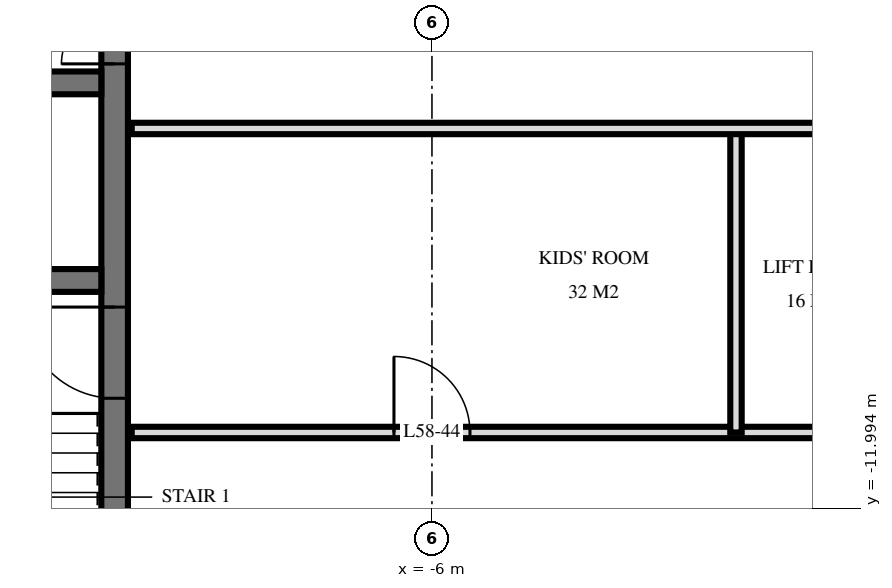
"""IFC4 building model, lengths in metres.
Left out: names, types, materials, properties, quantities, classifications, styles, units other than length and angle.
Written with IfcOpenShell. Run it as: python <this file> out.ifc"""

import sys

from ifc_helpers import new_model, si_unit, direction, frame, frame_2d, origin, place, context, subcontext, project, spatial, rectangle, extrude, element, fill, save


model = new_model("IFC4")
c1 = context("Model", 3, precision=1e-05, world=origin(), true_north=direction((0.0, 1.0)))
c2 = subcontext(c1, "Body", "Model", "MODEL_VIEW")
j1 = project(units=[si_unit("LENGTHUNIT", "METRE"), si_unit("PLANEANGLEUNIT", "RADIAN")], contexts=[c1])
p1 = place(None, origin())
s1 = spatial("IfcSite", under=j1, at=p1, CompositionType="ELEMENT")
p2 = place(p1, origin())
s2 = spatial("IfcBuilding", under=s1, at=p2, CompositionType="ELEMENT")
p3 = place(p2, frame((0.0, 0.0, 222.1)))
s3 = spatial("IfcBuildingStorey", under=s2, at=p3, CompositionType="ELEMENT", Elevation=222.1)
p4 = place(p3, frame((-10.175, -14.55, 0.0), z_axis=(0.0, 0.0, 1.0), x_axis=(0.0, 1.0, 0.0)))
e1 = element("IfcWall", 1, at=p4, inside=s3, PredefinedType="SHEAR", context=c2, shape_type="SweptSolid", body=[
    extrude(rectangle(XDim=14.1, YDim=0.35, at=frame_2d((7.05, 0.0))), origin(), (0.0, 0.0, 1.0), 3.5),
])
p5 = place(p4, frame((8.4, 0.0, 0.0)))
e2 = element("IfcOpeningElement", 2, at=p5, cuts=e1, PredefinedType="OPENING", context=c2, shape_type="SweptSolid", body=[
    extrude(rectangle(XDim=1.4, YDim=2.4, at=frame_2d((0.7, 1.2))), frame((0.0, 0.185, 0.0), z_axis=(0.0, -1.0, 0.0), x_axis=(1.0, 0.0, 0.0)), (0.0, 0.0, 1.0), 0.37),
])
p6 = place(p4, frame((10.0, 0.0, 0.0)))
e3 = element("IfcOpeningElement", 3, at=p6, cuts=e1, PredefinedType="OPENING", context=c2, shape_type="SweptSolid", body=[
    extrude(rectangle(XDim=1.4, YDim=2.4, at=frame_2d((0.7, 1.2))), frame((0.0, 0.185, 0.0), z_axis=(0.0, -1.0, 0.0), x_axis=(1.0, 0.0, 0.0)), (0.0, 0.0, 1.0), 0.37),
])
p7 = place(p4, frame((4.0, 0.0, 0.0)))
e4 = element("IfcOpeningElement", 4, at=p7, cuts=e1, PredefinedType="OPENING", context=c2, shape_type="SweptSolid", body=[
    extrude(rectangle(XDim=1.2, YDim=2.1, at=frame_2d((0.6, 1.05))), frame((0.0, 0.185, 0.0), z_axis=(0.0, -1.0, 0.0), x_axis=(1.0, 0.0, 0.0)), (0.0, 0.0, 1.0), 0.37),
])
p8 = place(p3, frame((-24.05, -6.4, 0.0), z_axis=(0.0, 0.0, 1.0), x_axis=(1.0, 0.0, 0.0)))
e5 = element("IfcWall", 5, at=p8, inside=s3, PredefinedType="SHEAR", context=c2, shape_type="SweptSolid", body=[
    extrude(rectangle(XDim=13.7, YDim=0.3, at=frame_2d((6.85, 0.0))), origin(), (0.0, 0.0, 1.0), 3.5),
])
p9 = place(p8, frame((0.55, 0.0, 0.0)))
e6 = element("IfcOpeningElement", 6, at=p9, cuts=e5, PredefinedType="OPENING", context=c2, shape_type="SweptSolid", body=[
    extrude(rectangle(XDim=1.1, YDim=2.1, at=frame_2d((0.55, 1.05))), frame((0.0, 0.16, 0.0), z_axis=(0.0, -1.0, 0.0), x_axis=(1.0, 0.0, 0.0)), (0.0, 0.0, 1.0), 0.32),
])
p10 = place(p8, frame((5.8, 0.0, 0.0)))
e7 = element("IfcOpeningElement", 7, at=p10, cuts=e5, PredefinedType="OPENING", context=c2, shape_type="SweptSolid", body=[
    extrude(rectangle(XDim=1.1, YDim=2.1, at=frame_2d((0.55, 1.05))), frame((0.0, 0.16, 0.0), z_axis=(0.0, -1.0, 0.0), x_axis=(1.0, 0.0, 0.0)), (0.0, 0.0, 1.0), 0.32),
])
p11 = place(p3, frame((-24.05, -9.0, 0.0), z_axis=(0.0, 0.0, 1.0), x_axis=(1.0, 0.0, 0.0)))
e8 = element("IfcWall", 8, at=p11, inside=s3, PredefinedType="SHEAR", context=c2, shape_type="SweptSolid", body=[
    extrude(rectangle(XDim=13.7, YDim=0.3, at=frame_2d((6.85, 0.0))), origin(), (0.0, 0.0, 1.0), 3.5),
])
p12 = place(p11, frame((8.8, 0.0, 0.0)))
e9 = element("IfcOpeningElement", 9, at=p12, cuts=e8, PredefinedType="OPENING", context=c2, shape_type="SweptSolid", body=[
    extrude(rectangle(XDim=1.1, YDim=2.1, at=frame_2d((0.55, 1.05))), frame((0.0, 0.16, 0.0), z_axis=(0.0, -1.0, 0.0), x_axis=(1.0, 0.0, 0.0)), (0.0, 0.0, 1.0), 0.32),
])
p13 = place(p3, frame((-2.0, -11.0, 0.0), z_axis=(0.0, 0.0, 1.0), x_axis=(0.0, 1.0, 0.0)))
e10 = element("IfcWall", 10, at=p13, inside=s3, PredefinedType="PARTITIONING", context=c2, shape_type="SweptSolid", body=[
    extrude(rectangle(XDim=4.0, YDim=0.15, at=frame_2d((2.0, 0.0))), origin(), (0.0, 0.0, 1.0), 3.22),
])
p14 = place(p3, frame((-9.95, -11.0, 0.0), z_axis=(0.0, 0.0, 1.0), x_axis=(1.0, 0.0, 0.0)))
e11 = element("IfcWall", 11, at=p14, inside=s3, PredefinedType="PARTITIONING", context=c2, shape_type="SweptSolid", body=[
    extrude(rectangle(XDim=19.9, YDim=0.15, at=frame_2d((9.95, 0.0))), origin(), (0.0, 0.0, 1.0), 3.22),
])
p15 = place(p14, frame((9.45, 0.0, 0.0)))
e12 = element("IfcOpeningElement", 12, at=p15, cuts=e11, PredefinedType="OPENING", context=c2, shape_type="SweptSolid", body=[
    extrude(rectangle(XDim=1.0, YDim=2.1, at=frame_2d((0.5, 1.05))), frame((0.0, 0.085, 0.0), z_axis=(0.0, -1.0, 0.0), x_axis=(1.0, 0.0, 0.0)), (0.0, 0.0, 1.0), 0.17),
])
p16 = place(p14, frame((3.45, 0.0, 0.0)))
e13 = element("IfcOpeningElement", 13, at=p16, cuts=e11, PredefinedType="OPENING", context=c2, shape_type="SweptSolid", body=[
    extrude(rectangle(XDim=1.0, YDim=2.1, at=frame_2d((0.5, 1.05))), frame((0.0, 0.085, 0.0), z_axis=(0.0, -1.0, 0.0), x_axis=(1.0, 0.0, 0.0)), (0.0, 0.0, 1.0), 0.17),
])
p17 = place(p3, frame((-9.95, -7.0, 0.0), z_axis=(0.0, 0.0, 1.0), x_axis=(1.0, 0.0, 0.0)))
e14 = element("IfcWall", 14, at=p17, inside=s3, PredefinedType="PARTITIONING", context=c2, shape_type="SweptSolid", body=[
    extrude(rectangle(XDim=19.9, YDim=0.15, at=frame_2d((9.95, 0.0))), origin(), (0.0, 0.0, 1.0), 3.22),
])
p18 = place(p17, frame((9.45, 0.0, 0.0)))
e15 = element("IfcOpeningElement", 15, at=p18, cuts=e14, PredefinedType="OPENING", context=c2, shape_type="SweptSolid", body=[
    extrude(rectangle(XDim=1.0, YDim=2.1, at=frame_2d((0.5, 1.05))), frame((0.0, 0.085, 0.0), z_axis=(0.0, -1.0, 0.0), x_axis=(1.0, 0.0, 0.0)), (0.0, 0.0, 1.0), 0.17),
])
p19 = place(p17, frame((15.45, 0.0, 0.0)))
e16 = element("IfcOpeningElement", 16, at=p19, cuts=e14, PredefinedType="OPENING", context=c2, shape_type="SweptSolid", body=[
    extrude(rectangle(XDim=1.0, YDim=2.1, at=frame_2d((0.5, 1.05))), frame((0.0, 0.085, 0.0), z_axis=(0.0, -1.0, 0.0), x_axis=(1.0, 0.0, 0.0)), (0.0, 0.0, 1.0), 0.17),
])
p20 = place(p5, origin())
e17 = element("IfcDoor", 17, at=p20, inside=s3, OperationType="DOUBLE_DOOR_SINGLE_SWING", PredefinedType="DOOR", context=c2, shape_type="SweptSolid", body=[
    extrude(rectangle(XDim=1.4, YDim=2.4, at=frame_2d((0.7, 1.2))), frame((0.0, 0.025, 0.0), z_axis=(0.0, -1.0, 0.0), x_axis=(1.0, 0.0, 0.0)), (0.0, 0.0, 1.0), 0.05),
])
fill(e2, e17)
p21 = place(p7, origin())
e18 = element("IfcDoor", 18, at=p21, inside=s3, OperationType="SINGLE_SWING_LEFT", PredefinedType="DOOR", context=c2, shape_type="SweptSolid", body=[
    extrude(rectangle(XDim=1.2, YDim=2.1, at=frame_2d((0.6, 1.05))), frame((0.0, 0.025, 0.0), z_axis=(0.0, -1.0, 0.0), x_axis=(1.0, 0.0, 0.0)), (0.0, 0.0, 1.0), 0.05),
])
fill(e4, e18)
p22 = place(p16, origin())
e19 = element("IfcDoor", 19, at=p22, inside=s3, OperationType="SINGLE_SWING_RIGHT", PredefinedType="DOOR", context=c2, shape_type="SweptSolid", body=[
    extrude(rectangle(XDim=1.0, YDim=2.1, at=frame_2d((0.5, 1.05))), frame((0.0, 0.025, 0.0), z_axis=(0.0, -1.0, 0.0), x_axis=(1.0, 0.0, 0.0)), (0.0, 0.0, 1.0), 0.05),
])
fill(e13, e19)
save(model, sys.argv[1])
